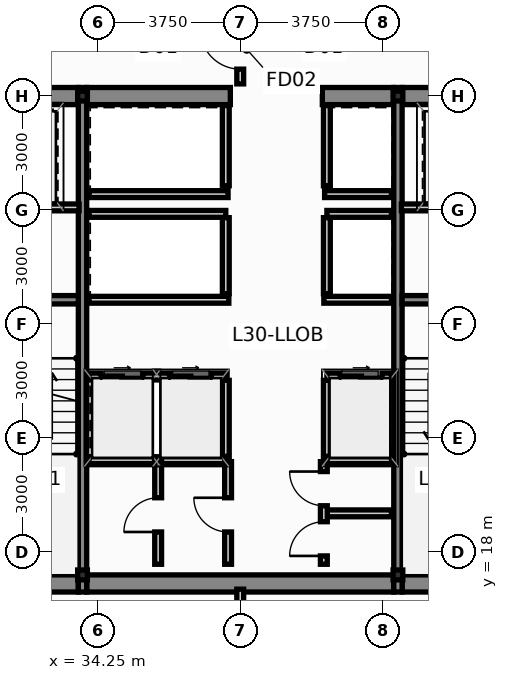
"""IFC4 building model, lengths in metres.
Left out: names, types, materials, properties, quantities, classifications, styles, units other than length and angle.
Written with IfcOpenShell. Run it as: python <this file> out.ifc"""

import sys

from ifc_helpers import new_model, si_unit, direction, frame, frame_2d, origin, origin_2d, place, context, subcontext, project, spatial, rectangle, i_section, extrude, source, transform, mapped, element, fill, save


model = new_model("IFC4")
c1 = context("Model", 3, precision=1e-05, world=origin(), true_north=direction((0.0, 1.0)))
c2 = subcontext(c1, "Body", "Model", "MODEL_VIEW")
j1 = project(units=[si_unit("LENGTHUNIT", "METRE"), si_unit("PLANEANGLEUNIT", "RADIAN")], contexts=[c1])
p1 = place(None, origin())
s1 = spatial("IfcSite", under=j1, at=p1, CompositionType="ELEMENT")
p2 = place(p1, origin())
s2 = spatial("IfcBuilding", under=s1, at=p2, CompositionType="ELEMENT")
p3 = place(p2, frame((0.0, 0.0, 116.35)))
s3 = spatial("IfcBuildingStorey", under=s2, at=p3, CompositionType="ELEMENT", Elevation=116.35)
m1 = source(origin(), c2, "Body", "SweptSolid", [
    extrude(i_section(OverallWidth=0.256, OverallDepth=0.26, WebThickness=0.01, FlangeThickness=0.017, at=origin_2d()), origin(), (0.0, 0.0, 1.0), 3.65),
])
for number, where, z_axis, x_axis in (
    (1, (33.85, 17.4, 0.0), (0.0, 0.0, 1.0), (1.0, 0.0, 0.0)),
    (2, (42.15, 17.4, 0.0), (0.0, 0.0, 1.0), (1.0, 0.0, 0.0)),
    (3, (33.85, 30.0, 0.0), (0.0, 0.0, 1.0), (1.0, 0.0, 0.0)),
    (4, (42.15, 30.0, 0.0), (0.0, 0.0, 1.0), (1.0, 0.0, 0.0)),
):
    element("IfcColumn", number, at=place(p3, frame(where, z_axis=z_axis, x_axis=x_axis)), inside=s3, PredefinedType="COLUMN", context=c2, shape_type="MappedRepresentation", body=[
        mapped(m1, transform((0.0, 0.0, 0.0), scale=1.0)),
    ])
p4 = place(p3, frame((30.84, 17.175, 0.0), z_axis=(0.0, 0.0, 1.0), x_axis=(1.0, 0.0, 0.0)))
e5 = element("IfcWall", 5, at=p4, inside=s3, PredefinedType="SHEAR", context=c2, shape_type="SweptSolid", body=[
    extrude(rectangle(XDim=2.9, YDim=0.45, at=frame_2d((1.45, 0.0))), origin(), (0.0, 0.0, 1.0), 3.65),
])
p5 = place(p3, frame((33.96, 17.175, 0.0), z_axis=(0.0, 0.0, 1.0), x_axis=(1.0, 0.0, 0.0)))
e6 = element("IfcWall", 6, at=p5, inside=s3, PredefinedType="SHEAR", context=c2, shape_type="SweptSolid", body=[
    extrude(rectangle(XDim=8.08, YDim=0.45, at=frame_2d((4.04, 0.0))), origin(), (0.0, 0.0, 1.0), 3.65),
])
for number, where, z_axis, x_axis in (
    (7, (42.26, 17.175, 0.0), (0.0, 0.0, 1.0), (1.0, 0.0, 0.0)),
    (8, (30.84, 30.0, 0.0), (0.0, 0.0, 1.0), (1.0, 0.0, 0.0)),
):
    element("IfcWall", number, at=place(p3, frame(where, z_axis=z_axis, x_axis=x_axis)), inside=s3, PredefinedType="SHEAR", context=c2, shape_type="SweptSolid", body=[
        extrude(rectangle(XDim=2.9, YDim=0.45, at=frame_2d((1.45, 0.0))), origin(), (0.0, 0.0, 1.0), 3.65),
    ])
p6 = place(p3, frame((33.96, 30.0, 0.0), z_axis=(0.0, 0.0, 1.0), x_axis=(1.0, 0.0, 0.0)))
e9 = element("IfcWall", 9, at=p6, inside=s3, PredefinedType="SHEAR", context=c2, shape_type="SweptSolid", body=[
    extrude(rectangle(XDim=3.78, YDim=0.45, at=frame_2d((1.89, 0.0))), origin(), (0.0, 0.0, 1.0), 3.65),
])
p7 = place(p3, frame((40.16, 30.0, 0.0), z_axis=(0.0, 0.0, 1.0), x_axis=(1.0, 0.0, 0.0)))
e10 = element("IfcWall", 10, at=p7, inside=s3, PredefinedType="SHEAR", context=c2, shape_type="SweptSolid", body=[
    extrude(rectangle(XDim=1.88, YDim=0.45, at=frame_2d((0.94, 0.0))), origin(), (0.0, 0.0, 1.0), 3.65),
])
p8 = place(p3, frame((42.26, 30.0, 0.0), z_axis=(0.0, 0.0, 1.0), x_axis=(1.0, 0.0, 0.0)))
e11 = element("IfcWall", 11, at=p8, inside=s3, PredefinedType="SHEAR", context=c2, shape_type="SweptSolid", body=[
    extrude(rectangle(XDim=2.9, YDim=0.45, at=frame_2d((1.45, 0.0))), origin(), (0.0, 0.0, 1.0), 3.65),
])
for number, where, z_axis, x_axis in (
    (12, (33.85, 16.95, 0.0), (0.0, 0.0, 1.0), (0.0, 1.0, 0.0)),
    (13, (42.15, 16.95, 0.0), (0.0, 0.0, 1.0), (0.0, 1.0, 0.0)),
):
    element("IfcWall", number, at=place(p3, frame(where, z_axis=z_axis, x_axis=x_axis)), inside=s3, PredefinedType="SHEAR", context=c2, shape_type="SweptSolid", body=[
        extrude(rectangle(XDim=13.275, YDim=0.22, at=frame_2d((6.638, 0.0))), origin(), (0.0, 0.0, 1.0), 3.65),
    ])
for number, where, z_axis, x_axis in (
    (14, (30.84, 24.64, 0.0), (0.0, 0.0, 1.0), (1.0, 0.0, 0.0)),
    (15, (42.26, 24.64, 0.0), (0.0, 0.0, 1.0), (1.0, 0.0, 0.0)),
):
    element("IfcWall", number, at=place(p3, frame(where, z_axis=z_axis, x_axis=x_axis)), inside=s3, PredefinedType="SHEAR", context=c2, shape_type="SweptSolid", body=[
        extrude(rectangle(XDim=2.9, YDim=0.22, at=frame_2d((1.45, 0.0))), origin(), (0.0, 0.0, 1.0), 3.65),
    ])
p9 = place(p3, frame((34.02, 22.62, 0.0), z_axis=(0.0, 0.0, 1.0), x_axis=(1.0, 0.0, 0.0)))
e16 = element("IfcWall", 16, at=p9, inside=s3, PredefinedType="PARTITIONING", context=c2, shape_type="SweptSolid", body=[
    extrude(rectangle(XDim=3.6, YDim=0.18, at=frame_2d((1.8, 0.0))), origin(), (0.0, 0.0, 1.0), 3.4),
])
p10 = place(p9, frame((0.32, 0.0, 0.0)))
e17 = element("IfcOpeningElement", 17, at=p10, cuts=e16, PredefinedType="OPENING", context=c2, shape_type="SweptSolid", body=[
    extrude(rectangle(XDim=1.1, YDim=2.2, at=frame_2d((0.55, 1.1))), frame((0.0, 0.102, 0.0), z_axis=(0.0, -1.0, 0.0), x_axis=(1.0, 0.0, 0.0)), (0.0, 0.0, 1.0), 0.204),
])
p11 = place(p9, frame((2.12, 0.0, 0.0)))
e18 = element("IfcOpeningElement", 18, at=p11, cuts=e16, PredefinedType="OPENING", context=c2, shape_type="SweptSolid", body=[
    extrude(rectangle(XDim=1.1, YDim=2.2, at=frame_2d((0.55, 1.1))), frame((0.0, 0.102, 0.0), z_axis=(0.0, -1.0, 0.0), x_axis=(1.0, 0.0, 0.0)), (0.0, 0.0, 1.0), 0.204),
])
p12 = place(p3, frame((40.28, 22.62, 0.0), z_axis=(0.0, 0.0, 1.0), x_axis=(1.0, 0.0, 0.0)))
e19 = element("IfcWall", 19, at=p12, inside=s3, PredefinedType="PARTITIONING", context=c2, shape_type="SweptSolid", body=[
    extrude(rectangle(XDim=1.7, YDim=0.18, at=frame_2d((0.85, 0.0))), origin(), (0.0, 0.0, 1.0), 3.4),
])
p13 = place(p12, frame((0.35, 0.0, 0.0)))
e20 = element("IfcOpeningElement", 20, at=p13, cuts=e19, PredefinedType="OPENING", context=c2, shape_type="SweptSolid", body=[
    extrude(rectangle(XDim=1.1, YDim=2.2, at=frame_2d((0.55, 1.1))), frame((0.0, 0.102, 0.0), z_axis=(0.0, -1.0, 0.0), x_axis=(1.0, 0.0, 0.0)), (0.0, 0.0, 1.0), 0.204),
])
for number, where, z_axis, x_axis in (
    (21, (37.62, 20.52, 0.0), (0.0, 0.0, 1.0), (0.0, 1.0, 0.0)),
    (22, (40.28, 20.52, 0.0), (0.0, 0.0, 1.0), (0.0, 1.0, 0.0)),
):
    element("IfcWall", number, at=place(p3, frame(where, z_axis=z_axis, x_axis=x_axis)), inside=s3, PredefinedType="PARTITIONING", context=c2, shape_type="SweptSolid", body=[
        extrude(rectangle(XDim=2.0, YDim=0.18, at=frame_2d((1.0, 0.0))), origin(), (0.0, 0.0, 1.0), 3.4),
    ])
p14 = place(p3, frame((34.02, 26.9, 0.0), z_axis=(0.0, 0.0, 1.0), x_axis=(1.0, 0.0, 0.0)))
e23 = element("IfcWall", 23, at=p14, inside=s3, PredefinedType="PARTITIONING", context=c2, shape_type="SweptSolid", body=[
    extrude(rectangle(XDim=3.6, YDim=0.18, at=frame_2d((1.8, 0.0))), origin(), (0.0, 0.0, 1.0), 3.4),
])
p15 = place(p3, frame((40.28, 26.9, 0.0), z_axis=(0.0, 0.0, 1.0), x_axis=(1.0, 0.0, 0.0)))
e24 = element("IfcWall", 24, at=p15, inside=s3, PredefinedType="PARTITIONING", context=c2, shape_type="SweptSolid", body=[
    extrude(rectangle(XDim=1.7, YDim=0.18, at=frame_2d((0.85, 0.0))), origin(), (0.0, 0.0, 1.0), 3.4),
])
for number, where, z_axis, x_axis in (
    (25, (37.62, 24.8, 0.0), (0.0, 0.0, 1.0), (0.0, 1.0, 0.0)),
    (26, (40.28, 24.8, 0.0), (0.0, 0.0, 1.0), (0.0, 1.0, 0.0)),
):
    element("IfcWall", number, at=place(p3, frame(where, z_axis=z_axis, x_axis=x_axis)), inside=s3, PredefinedType="PARTITIONING", context=c2, shape_type="SweptSolid", body=[
        extrude(rectangle(XDim=2.0, YDim=0.18, at=frame_2d((1.0, 0.0))), origin(), (0.0, 0.0, 1.0), 3.4),
    ])
p16 = place(p3, frame((34.02, 24.64, 0.0), z_axis=(0.0, 0.0, 1.0), x_axis=(1.0, 0.0, 0.0)))
e27 = element("IfcWall", 27, at=p16, inside=s3, PredefinedType="PARTITIONING", context=c2, shape_type="SweptSolid", body=[
    extrude(rectangle(XDim=3.68, YDim=0.18, at=frame_2d((1.84, 0.0))), origin(), (0.0, 0.0, 1.0), 3.4),
])
p17 = place(p3, frame((40.2, 24.64, 0.0), z_axis=(0.0, 0.0, 1.0), x_axis=(1.0, 0.0, 0.0)))
e28 = element("IfcWall", 28, at=p17, inside=s3, PredefinedType="PARTITIONING", context=c2, shape_type="SweptSolid", body=[
    extrude(rectangle(XDim=1.78, YDim=0.18, at=frame_2d((0.89, 0.0))), origin(), (0.0, 0.0, 1.0), 3.4),
])
p18 = place(p3, frame((34.02, 27.42, 0.0), z_axis=(0.0, 0.0, 1.0), x_axis=(1.0, 0.0, 0.0)))
e29 = element("IfcWall", 29, at=p18, inside=s3, PredefinedType="PARTITIONING", context=c2, shape_type="SweptSolid", body=[
    extrude(rectangle(XDim=3.66, YDim=0.18, at=frame_2d((1.83, 0.0))), origin(), (0.0, 0.0, 1.0), 3.4),
])
p19 = place(p3, frame((40.22, 27.42, 0.0), z_axis=(0.0, 0.0, 1.0), x_axis=(1.0, 0.0, 0.0)))
e30 = element("IfcWall", 30, at=p19, inside=s3, PredefinedType="PARTITIONING", context=c2, shape_type="SweptSolid", body=[
    extrude(rectangle(XDim=1.76, YDim=0.18, at=frame_2d((0.88, 0.0))), origin(), (0.0, 0.0, 1.0), 3.4),
])
for number, where, z_axis, x_axis in (
    (31, (37.62, 27.64, 0.0), (0.0, 0.0, 1.0), (0.0, 1.0, 0.0)),
    (32, (40.28, 27.64, 0.0), (0.0, 0.0, 1.0), (0.0, 1.0, 0.0)),
):
    element("IfcWall", number, at=place(p3, frame(where, z_axis=z_axis, x_axis=x_axis)), inside=s3, PredefinedType="PARTITIONING", context=c2, shape_type="SweptSolid", body=[
        extrude(rectangle(XDim=2.11, YDim=0.18, at=frame_2d((1.055, 0.0))), origin(), (0.0, 0.0, 1.0), 3.4),
    ])
for number, where, z_axis, x_axis in (
    (33, (30.86, 27.07, 0.0), (0.0, 0.0, 1.0), (1.0, 0.0, 0.0)),
    (34, (42.24, 27.07, 0.0), (0.0, 0.0, 1.0), (1.0, 0.0, 0.0)),
):
    element("IfcWall", number, at=place(p3, frame(where, z_axis=z_axis, x_axis=x_axis)), inside=s3, PredefinedType="PARTITIONING", context=c2, shape_type="SweptSolid", body=[
        extrude(rectangle(XDim=2.9, YDim=0.18, at=frame_2d((1.45, 0.0))), origin(), (0.0, 0.0, 1.0), 3.4),
    ])
p20 = place(p3, frame((34.02, 20.42, 0.0), z_axis=(0.0, 0.0, 1.0), x_axis=(1.0, 0.0, 0.0)))
e35 = element("IfcWall", 35, at=p20, inside=s3, PredefinedType="PARTITIONING", context=c2, shape_type="SweptSolid", body=[
    extrude(rectangle(XDim=3.64, YDim=0.18, at=frame_2d((1.82, 0.0))), origin(), (0.0, 0.0, 1.0), 3.4),
])
p21 = place(p3, frame((40.22, 20.42, 0.0), z_axis=(0.0, 0.0, 1.0), x_axis=(1.0, 0.0, 0.0)))
e36 = element("IfcWall", 36, at=p21, inside=s3, PredefinedType="PARTITIONING", context=c2, shape_type="SweptSolid", body=[
    extrude(rectangle(XDim=1.76, YDim=0.18, at=frame_2d((0.88, 0.0))), origin(), (0.0, 0.0, 1.0), 3.4),
])
p22 = place(p3, frame((35.84, 17.68, 0.0), z_axis=(0.0, 0.0, 1.0), x_axis=(0.0, 1.0, 0.0)))
e37 = element("IfcWall", 37, at=p22, inside=s3, PredefinedType="PARTITIONING", context=c2, shape_type="SweptSolid", body=[
    extrude(rectangle(XDim=2.7, YDim=0.18, at=frame_2d((1.35, 0.0))), origin(), (0.0, 0.0, 1.0), 3.4),
])
p23 = place(p22, frame((0.85, 0.0, 0.0)))
e38 = element("IfcOpeningElement", 38, at=p23, cuts=e37, PredefinedType="OPENING", context=c2, shape_type="SweptSolid", body=[
    extrude(rectangle(XDim=0.9, YDim=2.1, at=frame_2d((0.45, 1.05))), frame((0.0, 0.102, 0.0), z_axis=(0.0, -1.0, 0.0), x_axis=(1.0, 0.0, 0.0)), (0.0, 0.0, 1.0), 0.204),
])
p24 = place(p3, frame((37.68, 17.68, 0.0), z_axis=(0.0, 0.0, 1.0), x_axis=(0.0, 1.0, 0.0)))
e39 = element("IfcWall", 39, at=p24, inside=s3, PredefinedType="PARTITIONING", context=c2, shape_type="SweptSolid", body=[
    extrude(rectangle(XDim=2.7, YDim=0.18, at=frame_2d((1.35, 0.0))), origin(), (0.0, 0.0, 1.0), 3.4),
])
p25 = place(p24, frame((0.85, 0.0, 0.0)))
e40 = element("IfcOpeningElement", 40, at=p25, cuts=e39, PredefinedType="OPENING", context=c2, shape_type="SweptSolid", body=[
    extrude(rectangle(XDim=0.9, YDim=2.1, at=frame_2d((0.45, 1.05))), frame((0.0, 0.102, 0.0), z_axis=(0.0, -1.0, 0.0), x_axis=(1.0, 0.0, 0.0)), (0.0, 0.0, 1.0), 0.204),
])
p26 = place(p3, frame((40.28, 19.02, 0.0), z_axis=(0.0, 0.0, 1.0), x_axis=(1.0, 0.0, 0.0)))
e41 = element("IfcWall", 41, at=p26, inside=s3, PredefinedType="PARTITIONING", context=c2, shape_type="SweptSolid", body=[
    extrude(rectangle(XDim=1.7, YDim=0.18, at=frame_2d((0.85, 0.0))), origin(), (0.0, 0.0, 1.0), 3.4),
])
p27 = place(p3, frame((40.2, 17.68, 0.0), z_axis=(0.0, 0.0, 1.0), x_axis=(0.0, 1.0, 0.0)))
e42 = element("IfcWall", 42, at=p27, inside=s3, PredefinedType="PARTITIONING", context=c2, shape_type="SweptSolid", body=[
    extrude(rectangle(XDim=2.7, YDim=0.18, at=frame_2d((1.35, 0.0))), origin(), (0.0, 0.0, 1.0), 3.4),
])
p28 = place(p27, frame((0.22, 0.0, 0.0)))
e43 = element("IfcOpeningElement", 43, at=p28, cuts=e42, PredefinedType="OPENING", context=c2, shape_type="SweptSolid", body=[
    extrude(rectangle(XDim=0.9, YDim=2.1, at=frame_2d((0.45, 1.05))), frame((0.0, 0.102, 0.0), z_axis=(0.0, -1.0, 0.0), x_axis=(1.0, 0.0, 0.0)), (0.0, 0.0, 1.0), 0.204),
])
p29 = place(p27, frame((1.54, 0.0, 0.0)))
e44 = element("IfcOpeningElement", 44, at=p29, cuts=e42, PredefinedType="OPENING", context=c2, shape_type="SweptSolid", body=[
    extrude(rectangle(XDim=0.9, YDim=2.1, at=frame_2d((0.45, 1.05))), frame((0.0, 0.102, 0.0), z_axis=(0.0, -1.0, 0.0), x_axis=(1.0, 0.0, 0.0)), (0.0, 0.0, 1.0), 0.204),
])
p30 = place(p3, frame((38.0, 15.205, 0.0), z_axis=(0.0, 0.0, 1.0), x_axis=(0.0, 1.0, 0.0)))
e45 = element("IfcWall", 45, at=p30, inside=s3, PredefinedType="PARTITIONING", context=c2, shape_type="SweptSolid", body=[
    extrude(rectangle(XDim=1.82, YDim=0.18, at=frame_2d((0.91, 0.0))), origin(), (0.0, 0.0, 1.0), 3.4),
])
p31 = place(p30, frame((0.385, 0.0, 0.0)))
e46 = element("IfcOpeningElement", 46, at=p31, cuts=e45, PredefinedType="OPENING", context=c2, shape_type="SweptSolid", body=[
    extrude(rectangle(XDim=1.05, YDim=2.15, at=frame_2d((0.525, 1.075))), frame((0.0, 0.102, 0.0), z_axis=(0.0, -1.0, 0.0), x_axis=(1.0, 0.0, 0.0)), (0.0, 0.0, 1.0), 0.204),
])
p32 = place(p3, frame((38.0, 30.32, 0.0), z_axis=(0.0, 0.0, 1.0), x_axis=(0.0, 1.0, 0.0)))
e47 = element("IfcWall", 47, at=p32, inside=s3, PredefinedType="PARTITIONING", context=c2, shape_type="SweptSolid", body=[
    extrude(rectangle(XDim=1.825, YDim=0.18, at=frame_2d((0.913, 0.0))), origin(), (0.0, 0.0, 1.0), 3.4),
])
p33 = place(p32, frame((0.388, 0.0, 0.0)))
e48 = element("IfcOpeningElement", 48, at=p33, cuts=e47, PredefinedType="OPENING", context=c2, shape_type="SweptSolid", body=[
    extrude(rectangle(XDim=1.05, YDim=2.15, at=frame_2d((0.525, 1.075))), frame((0.0, 0.102, 0.0), z_axis=(0.0, -1.0, 0.0), x_axis=(1.0, 0.0, 0.0)), (0.0, 0.0, 1.0), 0.204),
])
p34 = place(p10, origin())
e49 = element("IfcDoor", 49, at=p34, inside=s3, OperationType="SLIDING_TO_LEFT", PredefinedType="DOOR", context=c2, shape_type="SweptSolid", body=[
    extrude(rectangle(XDim=1.1, YDim=2.2, at=frame_2d((0.55, 1.1))), frame((0.0, 0.025, 0.0), z_axis=(0.0, -1.0, 0.0), x_axis=(1.0, 0.0, 0.0)), (0.0, 0.0, 1.0), 0.05),
])
fill(e17, e49)
p35 = place(p11, origin())
e50 = element("IfcDoor", 50, at=p35, inside=s3, OperationType="SLIDING_TO_RIGHT", PredefinedType="DOOR", context=c2, shape_type="SweptSolid", body=[
    extrude(rectangle(XDim=1.1, YDim=2.2, at=frame_2d((0.55, 1.1))), frame((0.0, 0.025, 0.0), z_axis=(0.0, -1.0, 0.0), x_axis=(1.0, 0.0, 0.0)), (0.0, 0.0, 1.0), 0.05),
])
fill(e18, e50)
p36 = place(p13, origin())
e51 = element("IfcDoor", 51, at=p36, inside=s3, OperationType="SLIDING_TO_LEFT", PredefinedType="DOOR", context=c2, shape_type="SweptSolid", body=[
    extrude(rectangle(XDim=1.1, YDim=2.2, at=frame_2d((0.55, 1.1))), frame((0.0, 0.025, 0.0), z_axis=(0.0, -1.0, 0.0), x_axis=(1.0, 0.0, 0.0)), (0.0, 0.0, 1.0), 0.05),
])
fill(e20, e51)
p37 = place(p23, origin())
e52 = element("IfcDoor", 52, at=p37, inside=s3, OperationType="SINGLE_SWING_LEFT", PredefinedType="DOOR", context=c2, shape_type="SweptSolid", body=[
    extrude(rectangle(XDim=0.9, YDim=2.1, at=frame_2d((0.45, 1.05))), frame((0.0, 0.025, 0.0), z_axis=(0.0, -1.0, 0.0), x_axis=(1.0, 0.0, 0.0)), (0.0, 0.0, 1.0), 0.05),
])
fill(e38, e52)
p38 = place(p25, origin())
e53 = element("IfcDoor", 53, at=p38, inside=s3, OperationType="SINGLE_SWING_RIGHT", PredefinedType="DOOR", context=c2, shape_type="SweptSolid", body=[
    extrude(rectangle(XDim=0.9, YDim=2.1, at=frame_2d((0.45, 1.05))), frame((0.0, 0.025, 0.0), z_axis=(0.0, -1.0, 0.0), x_axis=(1.0, 0.0, 0.0)), (0.0, 0.0, 1.0), 0.05),
])
fill(e40, e53)
p39 = place(p28, origin())
e54 = element("IfcDoor", 54, at=p39, inside=s3, OperationType="SINGLE_SWING_LEFT", PredefinedType="DOOR", context=c2, shape_type="SweptSolid", body=[
    extrude(rectangle(XDim=0.9, YDim=2.1, at=frame_2d((0.45, 1.05))), frame((0.0, 0.025, 0.0), z_axis=(0.0, -1.0, 0.0), x_axis=(1.0, 0.0, 0.0)), (0.0, 0.0, 1.0), 0.05),
])
fill(e43, e54)
p40 = place(p29, origin())
e55 = element("IfcDoor", 55, at=p40, inside=s3, OperationType="SINGLE_SWING_RIGHT", PredefinedType="DOOR", context=c2, shape_type="SweptSolid", body=[
    extrude(rectangle(XDim=0.9, YDim=2.1, at=frame_2d((0.45, 1.05))), frame((0.0, 0.025, 0.0), z_axis=(0.0, -1.0, 0.0), x_axis=(1.0, 0.0, 0.0)), (0.0, 0.0, 1.0), 0.05),
])
fill(e44, e55)
p41 = place(p33, origin())
e56 = element("IfcDoor", 56, at=p41, inside=s3, OperationType="SINGLE_SWING_RIGHT", PredefinedType="DOOR", context=c2, shape_type="SweptSolid", body=[
    extrude(rectangle(XDim=1.05, YDim=2.15, at=frame_2d((0.525, 1.075))), frame((0.0, 0.025, 0.0), z_axis=(0.0, -1.0, 0.0), x_axis=(1.0, 0.0, 0.0)), (0.0, 0.0, 1.0), 0.05),
])
fill(e48, e56)
save(model, sys.argv[1])
